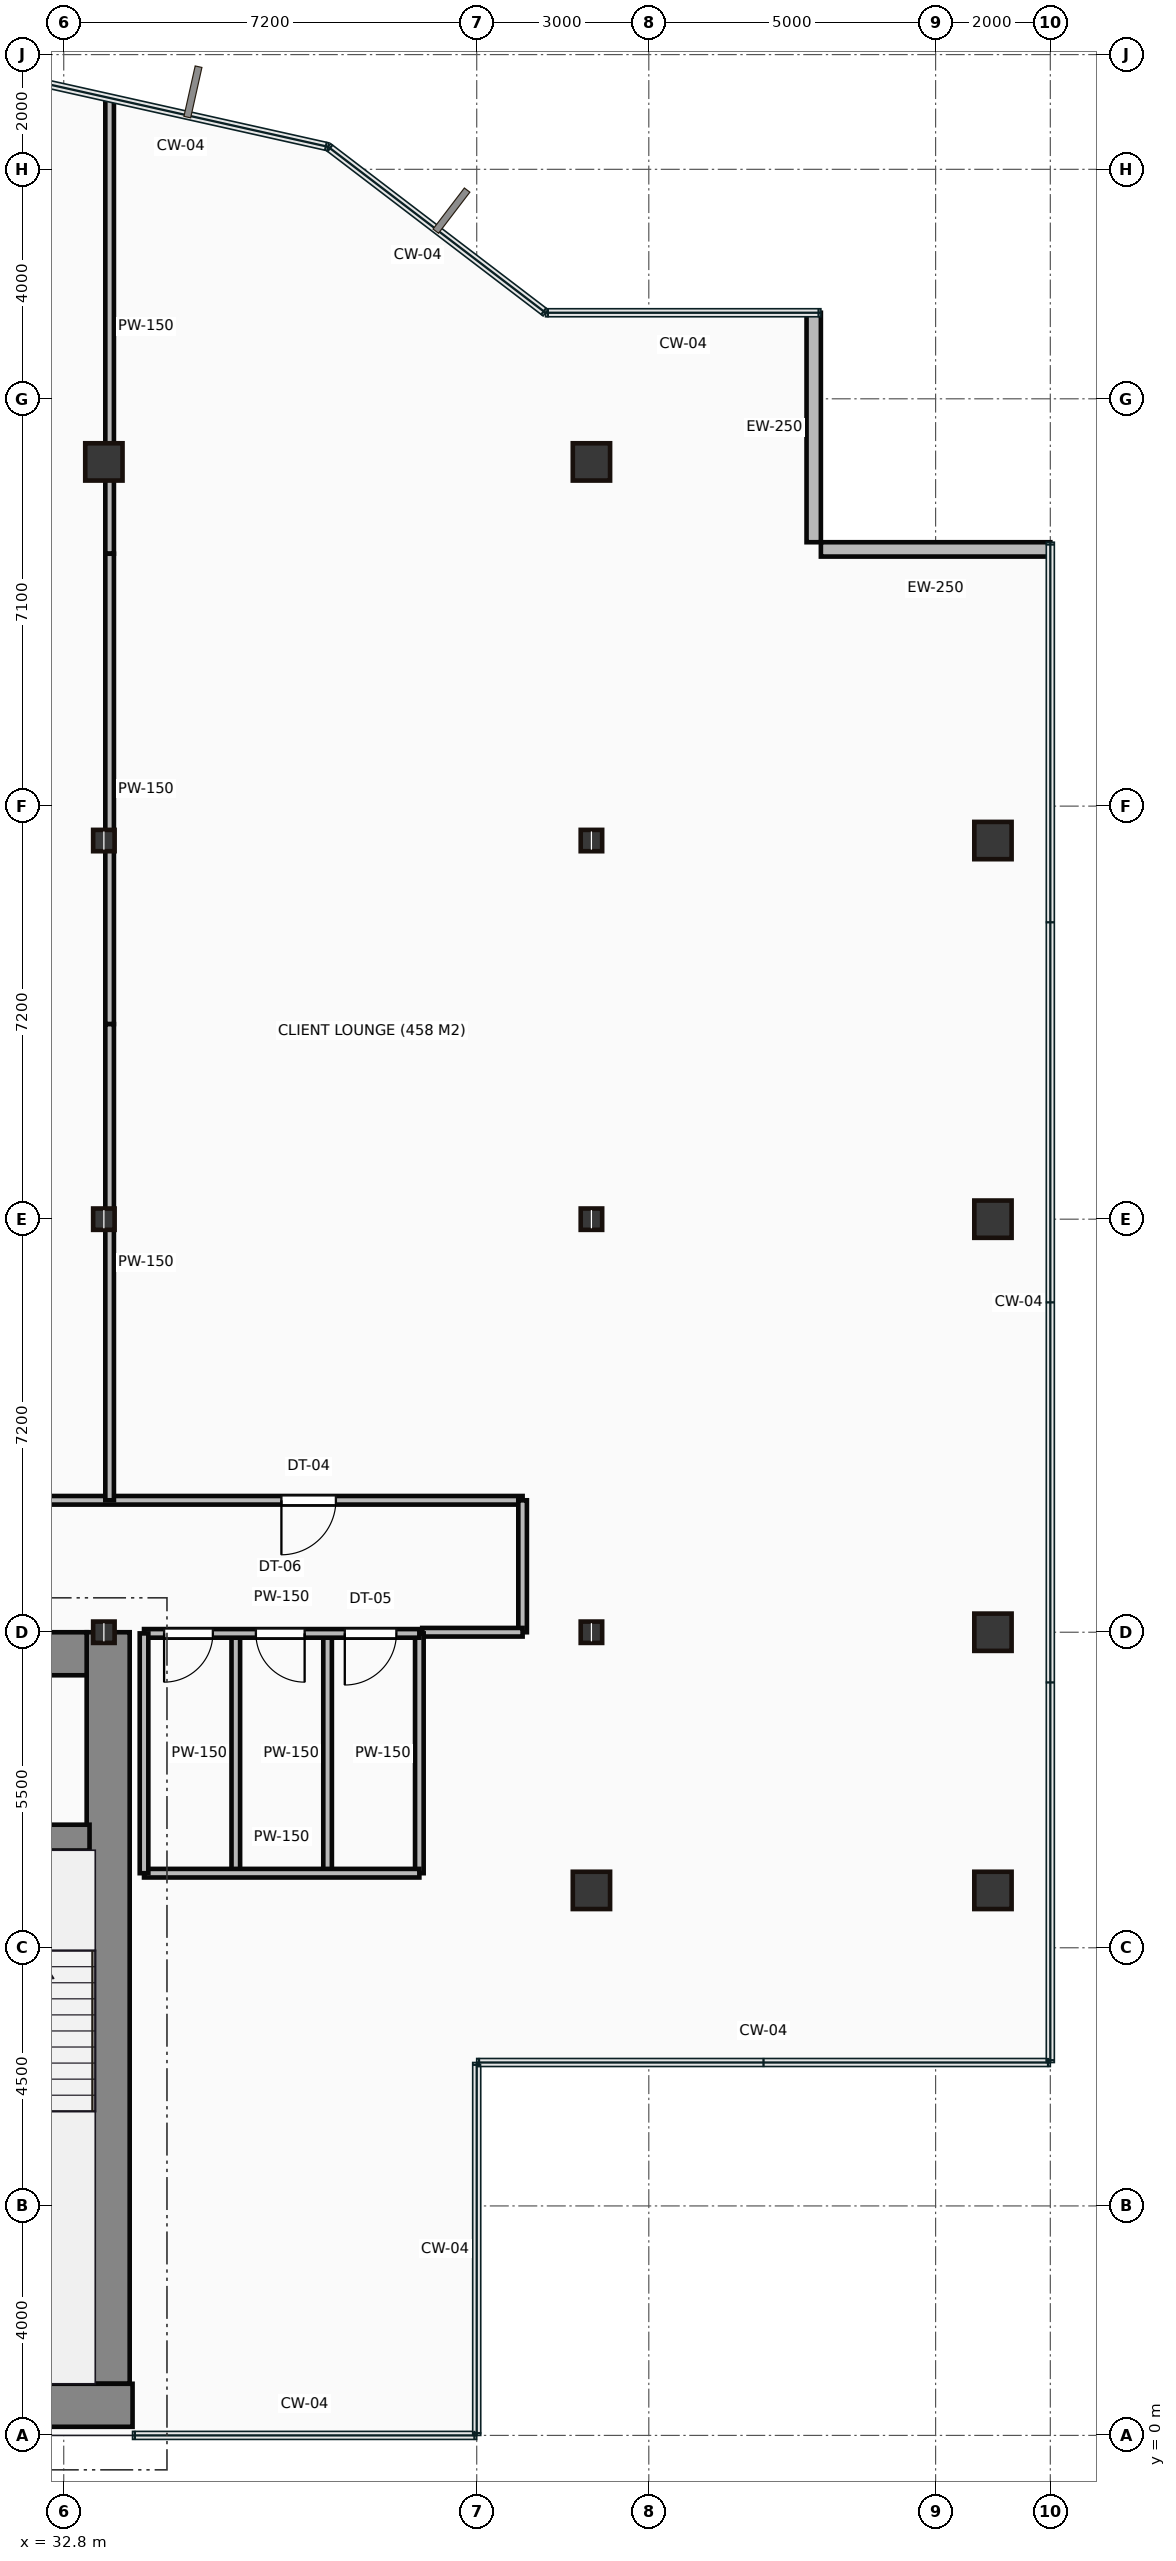
"""IFC4 building model, lengths in metres.
Left out: names, types, materials, properties, quantities, classifications, styles, units other than length and angle.
Written with IfcOpenShell. Run it as: python <this file> out.ifc"""

import sys

from ifc_helpers import new_model, si_unit, direction, frame, frame_2d, origin, origin_2d, place, context, subcontext, project, spatial, rectangle, hollow_rectangle, i_section, extrude, source, transform, mapped, element, fill, save


model = new_model("IFC4")
c1 = context("Model", 3, precision=1e-05, world=origin(), true_north=direction((0.0, 1.0)))
c2 = subcontext(c1, "Body", "Model", "MODEL_VIEW")
j1 = project(units=[si_unit("LENGTHUNIT", "METRE"), si_unit("PLANEANGLEUNIT", "RADIAN")], contexts=[c1])
p1 = place(None, origin())
s1 = spatial("IfcSite", under=j1, at=p1, CompositionType="ELEMENT")
p2 = place(p1, origin())
s2 = spatial("IfcBuilding", under=s1, at=p2, CompositionType="ELEMENT")
p3 = place(p2, frame((0.0, 0.0, 169.8)))
s3 = spatial("IfcBuildingStorey", under=s2, at=p3, CompositionType="ELEMENT", Elevation=169.8)
m1 = source(origin(), c2, "Body", "SweptSolid", [
    extrude(rectangle(XDim=29.5, YDim=0.75, at=frame_2d((14.75, 0.0))), origin(), (0.0, 0.0, 1.0), 3.65),
])
p4 = place(p3, frame((4.5, 0.525, 0.0), z_axis=(0.0, 0.0, 1.0), x_axis=(1.0, 0.0, 0.0)))
e1 = element("IfcWall", 1, at=p4, inside=s3, PredefinedType="SHEAR", context=c2, shape_type="MappedRepresentation", body=[
    mapped(m1, transform((0.0, 0.0, 0.0))),
])
m2 = source(origin(), c2, "Body", "SweptSolid", [
    extrude(rectangle(XDim=13.1, YDim=0.75, at=frame_2d((6.55, 0.0))), origin(), (0.0, 0.0, 1.0), 3.65),
])
p5 = place(p3, frame((33.575, 0.9, 0.0), z_axis=(0.0, 0.0, 1.0), x_axis=(0.0, 1.0, 0.0)))
e2 = element("IfcWall", 2, at=p5, inside=s3, PredefinedType="SHEAR", context=c2, shape_type="MappedRepresentation", body=[
    mapped(m2, transform((0.0, 0.0, 0.0))),
])
m3 = source(origin(), c2, "Body", "SweptSolid", [
    extrude(rectangle(XDim=12.6, YDim=0.75, at=frame_2d((6.3, 0.0))), origin(), (0.0, 0.0, 1.0), 3.65),
])
p6 = place(p3, frame((20.6, 13.625, 0.0), z_axis=(0.0, 0.0, 1.0), x_axis=(1.0, 0.0, 0.0)))
e3 = element("IfcWall", 3, at=p6, inside=s3, PredefinedType="SHEAR", context=c2, shape_type="MappedRepresentation", body=[
    mapped(m3, transform((0.0, 0.0, 0.0))),
])
p7 = place(p6, frame((9.25, 0.0, 0.0)))
e4 = element("IfcOpeningElement", 4, at=p7, cuts=e3, PredefinedType="OPENING", context=c2, shape_type="SweptSolid", body=[
    extrude(rectangle(XDim=1.1, YDim=2.15, at=frame_2d((0.55, 1.075))), frame((0.0, 0.385, 0.0), z_axis=(0.0, -1.0, 0.0), x_axis=(1.0, 0.0, 0.0)), (0.0, 0.0, 1.0), 0.77),
])
m4 = source(origin(), c2, "Body", "SweptSolid", [
    extrude(rectangle(XDim=3.39, YDim=0.45, at=frame_2d((1.695, 0.0))), origin(), (0.0, 0.0, 1.0), 3.65),
])
p8 = place(p3, frame((29.86, 10.42, 0.0), z_axis=(0.0, 0.0, 1.0), x_axis=(1.0, 0.0, 0.0)))
e5 = element("IfcWall", 5, at=p8, inside=s3, PredefinedType="SHEAR", context=c2, shape_type="MappedRepresentation", body=[
    mapped(m4, transform((0.0, 0.0, 0.0))),
])
p9 = place(p8, frame((1.1, 0.0, 0.0)))
e6 = element("IfcOpeningElement", 6, at=p9, cuts=e5, PredefinedType="OPENING", context=c2, shape_type="SweptSolid", body=[
    extrude(rectangle(XDim=1.1, YDim=2.15, at=frame_2d((0.55, 1.075))), frame((0.0, 0.235, 0.0), z_axis=(0.0, -1.0, 0.0), x_axis=(1.0, 0.0, 0.0)), (0.0, 0.0, 1.0), 0.47),
])
m5 = source(origin(), c2, "Body", "SweptSolid", [
    extrude(i_section(OverallWidth=0.374, OverallDepth=0.372, WebThickness=0.016, FlangeThickness=0.026, at=origin_2d()), origin(), (0.0, 0.0, 1.0), 3.65),
])
for number, where, z_axis, x_axis in (
    (7, (33.5, 14.0, 0.0), (0.0, 0.0, 1.0), (1.0, 0.0, 0.0)),
    (8, (33.5, 21.2, 0.0), (0.0, 0.0, 1.0), (1.0, 0.0, 0.0)),
    (9, (33.5, 27.8, 0.0), (0.0, 0.0, 1.0), (1.0, 0.0, 0.0)),
):
    element("IfcColumn", number, at=place(p3, frame(where, z_axis=z_axis, x_axis=x_axis)), inside=s3, PredefinedType="COLUMN", context=c2, shape_type="MappedRepresentation", body=[
        mapped(m5, transform((0.0, 0.0, 0.0))),
    ])
m6 = source(origin(), c2, "Body", "SweptSolid", [
    extrude(hollow_rectangle(XDim=0.65, YDim=0.65, WallThickness=0.032, at=origin_2d()), origin(), (0.0, 0.0, 1.0), 3.65),
])
for number, where, z_axis, x_axis in (
    (10, (33.5, 34.4, 0.0), (0.0, 0.0, 1.0), (1.0, 0.0, 0.0)),
    (11, (42.0, 9.5, 0.0), (0.0, 0.0, 1.0), (1.0, 0.0, 0.0)),
):
    element("IfcColumn", number, at=place(p3, frame(where, z_axis=z_axis, x_axis=x_axis)), inside=s3, PredefinedType="COLUMN", context=c2, shape_type="MappedRepresentation", body=[
        mapped(m6, transform((0.0, 0.0, 0.0))),
    ])
for number, where, z_axis, x_axis in (
    (12, (42.0, 14.0, 0.0), (0.0, 0.0, 1.0), (1.0, 0.0, 0.0)),
    (13, (42.0, 21.2, 0.0), (0.0, 0.0, 1.0), (1.0, 0.0, 0.0)),
    (14, (42.0, 27.8, 0.0), (0.0, 0.0, 1.0), (1.0, 0.0, 0.0)),
):
    element("IfcColumn", number, at=place(p3, frame(where, z_axis=z_axis, x_axis=x_axis)), inside=s3, PredefinedType="COLUMN", context=c2, shape_type="MappedRepresentation", body=[
        mapped(m5, transform((0.0, 0.0, 0.0))),
    ])
for number, where, z_axis, x_axis in (
    (15, (42.0, 34.4, 0.0), (0.0, 0.0, 1.0), (1.0, 0.0, 0.0)),
    (16, (49.0, 9.5, 0.0), (0.0, 0.0, 1.0), (1.0, 0.0, 0.0)),
    (17, (49.0, 14.0, 0.0), (0.0, 0.0, 1.0), (1.0, 0.0, 0.0)),
    (18, (49.0, 21.2, 0.0), (0.0, 0.0, 1.0), (1.0, 0.0, 0.0)),
    (19, (49.0, 27.8, 0.0), (0.0, 0.0, 1.0), (1.0, 0.0, 0.0)),
):
    element("IfcColumn", number, at=place(p3, frame(where, z_axis=z_axis, x_axis=x_axis)), inside=s3, PredefinedType="COLUMN", context=c2, shape_type="MappedRepresentation", body=[
        mapped(m6, transform((0.0, 0.0, 0.0))),
    ])
m7 = source(origin(), c2, "Body", "SweptSolid", [
    extrude(rectangle(XDim=4.0, YDim=0.25, at=frame_2d((2.0, 0.0))), origin(), (0.0, 0.0, 1.0), 3.4),
])
for number, where, z_axis, x_axis in (
    (20, (50.0, 32.875, 0.0), (0.0, 0.0, 1.0), (-1.0, 0.0, 0.0)),
    (21, (45.875, 33.0, 0.0), (0.0, 0.0, 1.0), (0.0, 1.0, 0.0)),
):
    element("IfcWall", number, at=place(p3, frame(where, z_axis=z_axis, x_axis=x_axis)), inside=s3, PredefinedType="STANDARD", context=c2, shape_type="MappedRepresentation", body=[
        mapped(m7, transform((0.0, 0.0, 0.0))),
    ])
m8 = source(origin(), c2, "Body", "SweptSolid", [
    extrude(rectangle(XDim=4.8, YDim=0.15, at=frame_2d((2.4, 0.0))), origin(), (0.0, 0.0, 1.0), 2.76),
])
p10 = place(p3, frame((34.2, 13.98, 0.0), z_axis=(0.0, 0.0, 1.0), x_axis=(1.0, 0.0, 0.0)))
e22 = element("IfcWall", 22, at=p10, inside=s3, PredefinedType="PARTITIONING", context=c2, shape_type="MappedRepresentation", body=[
    mapped(m8, transform((0.0, 0.0, 0.0))),
])
p11 = place(p10, frame((0.35, 0.0, 0.0)))
e23 = element("IfcOpeningElement", 23, at=p11, cuts=e22, PredefinedType="OPENING", context=c2, shape_type="SweptSolid", body=[
    extrude(rectangle(XDim=0.85, YDim=2.1, at=frame_2d((0.425, 1.05))), frame((0.0, 0.085, 0.0), z_axis=(0.0, -1.0, 0.0), x_axis=(1.0, 0.0, 0.0)), (0.0, 0.0, 1.0), 0.17),
])
p12 = place(p10, frame((1.95, 0.0, 0.0)))
e24 = element("IfcOpeningElement", 24, at=p12, cuts=e22, PredefinedType="OPENING", context=c2, shape_type="SweptSolid", body=[
    extrude(rectangle(XDim=0.85, YDim=2.1, at=frame_2d((0.425, 1.05))), frame((0.0, 0.085, 0.0), z_axis=(0.0, -1.0, 0.0), x_axis=(1.0, 0.0, 0.0)), (0.0, 0.0, 1.0), 0.17),
])
p13 = place(p10, frame((3.5, 0.0, 0.0)))
e25 = element("IfcOpeningElement", 25, at=p13, cuts=e22, PredefinedType="OPENING", context=c2, shape_type="SweptSolid", body=[
    extrude(rectangle(XDim=0.9, YDim=2.1, at=frame_2d((0.45, 1.05))), frame((0.0, 0.085, 0.0), z_axis=(0.0, -1.0, 0.0), x_axis=(1.0, 0.0, 0.0)), (0.0, 0.0, 1.0), 0.17),
])
m9 = source(origin(), c2, "Body", "SweptSolid", [
    extrude(rectangle(XDim=4.8, YDim=0.15, at=frame_2d((2.4, 0.0))), origin(), (0.0, 0.0, 1.0), 3.4),
])
p14 = place(p3, frame((34.2, 9.8, 0.0), z_axis=(0.0, 0.0, 1.0), x_axis=(1.0, 0.0, 0.0)))
e26 = element("IfcWall", 26, at=p14, inside=s3, PredefinedType="PARTITIONING", context=c2, shape_type="MappedRepresentation", body=[
    mapped(m9, transform((0.0, 0.0, 0.0))),
])
m10 = source(origin(), c2, "Body", "SweptSolid", [
    extrude(rectangle(XDim=4.18, YDim=0.15, at=frame_2d((2.09, 0.0))), origin(), (0.0, 0.0, 1.0), 3.4),
])
for number, where, z_axis, x_axis in (
    (27, (39.0, 9.8, 0.0), (0.0, 0.0, 1.0), (0.0, 1.0, 0.0)),
    (28, (34.2, 9.8, 0.0), (0.0, 0.0, 1.0), (0.0, 1.0, 0.0)),
    (29, (35.8, 9.8, 0.0), (0.0, 0.0, 1.0), (0.0, 1.0, 0.0)),
    (30, (37.4, 9.8, 0.0), (0.0, 0.0, 1.0), (0.0, 1.0, 0.0)),
):
    element("IfcWall", number, at=place(p3, frame(where, z_axis=z_axis, x_axis=x_axis)), inside=s3, PredefinedType="PARTITIONING", context=c2, shape_type="MappedRepresentation", body=[
        mapped(m10, transform((0.0, 0.0, 0.0))),
    ])
m11 = source(origin(), c2, "Body", "SweptSolid", [
    extrude(rectangle(XDim=28.75, YDim=0.15, at=frame_2d((14.375, 0.0))), origin(), (0.0, 0.0, 1.0), 3.4),
])
p15 = place(p3, frame((12.05, 16.3, 0.0), z_axis=(0.0, 0.0, 1.0), x_axis=(1.0, 0.0, 0.0)))
e31 = element("IfcWall", 31, at=p15, inside=s3, PredefinedType="PARTITIONING", context=c2, shape_type="MappedRepresentation", body=[
    mapped(m11, transform((0.0, 0.0, 0.0))),
])
p16 = place(p15, frame((4.83, 0.0, 0.0)))
e32 = element("IfcOpeningElement", 32, at=p16, cuts=e31, PredefinedType="OPENING", context=c2, shape_type="SweptSolid", body=[
    extrude(rectangle(XDim=0.95, YDim=2.15, at=frame_2d((0.475, 1.075))), frame((0.0, 0.085, 0.0), z_axis=(0.0, -1.0, 0.0), x_axis=(1.0, 0.0, 0.0)), (0.0, 0.0, 1.0), 0.17),
])
p17 = place(p15, frame((15.475, 0.0, 0.0)))
e33 = element("IfcOpeningElement", 33, at=p17, cuts=e31, PredefinedType="OPENING", context=c2, shape_type="SweptSolid", body=[
    extrude(rectangle(XDim=0.95, YDim=2.15, at=frame_2d((0.475, 1.075))), frame((0.0, 0.085, 0.0), z_axis=(0.0, -1.0, 0.0), x_axis=(1.0, 0.0, 0.0)), (0.0, 0.0, 1.0), 0.17),
])
p18 = place(p15, frame((24.545, 0.0, 0.0)))
e34 = element("IfcOpeningElement", 34, at=p18, cuts=e31, PredefinedType="OPENING", context=c2, shape_type="SweptSolid", body=[
    extrude(rectangle(XDim=0.95, YDim=2.15, at=frame_2d((0.475, 1.075))), frame((0.0, 0.085, 0.0), z_axis=(0.0, -1.0, 0.0), x_axis=(1.0, 0.0, 0.0)), (0.0, 0.0, 1.0), 0.17),
])
m12 = source(origin(), c2, "Body", "SweptSolid", [
    extrude(rectangle(XDim=2.3, YDim=0.15, at=frame_2d((1.15, 0.0))), origin(), (0.0, 0.0, 1.0), 3.4),
])
p19 = place(p3, frame((40.8, 16.3, 0.0), z_axis=(0.0, 0.0, 1.0), x_axis=(0.0, -1.0, 0.0)))
e35 = element("IfcWall", 35, at=p19, inside=s3, PredefinedType="PARTITIONING", context=c2, shape_type="MappedRepresentation", body=[
    mapped(m12, transform((0.0, 0.0, 0.0))),
])
m13 = source(origin(), c2, "Body", "SweptSolid", [
    extrude(rectangle(XDim=1.75, YDim=0.15, at=frame_2d((0.875, 0.0))), origin(), (0.0, 0.0, 1.0), 2.76),
])
p20 = place(p3, frame((40.8, 14.0, 0.0), z_axis=(0.0, 0.0, 1.0), x_axis=(-1.0, 0.0, 0.0)))
e36 = element("IfcWall", 36, at=p20, inside=s3, PredefinedType="PARTITIONING", context=c2, shape_type="MappedRepresentation", body=[
    mapped(m13, transform((0.0, 0.0, 0.0))),
])
m14 = source(origin(), c2, "Body", "SweptSolid", [
    extrude(rectangle(XDim=7.923, YDim=0.15, at=frame_2d((3.962, 0.0))), origin(), (0.0, 0.0, 1.0), 2.76),
])
p21 = place(p3, frame((33.6, 40.723, 0.0), z_axis=(0.0, 0.0, 1.0), x_axis=(0.0, -1.0, 0.0)))
e37 = element("IfcWall", 37, at=p21, inside=s3, PredefinedType="PARTITIONING", context=c2, shape_type="MappedRepresentation", body=[
    mapped(m14, transform((0.0, 0.0, 0.0))),
])
m15 = source(origin(), c2, "Body", "SweptSolid", [
    extrude(rectangle(XDim=8.2, YDim=0.15, at=frame_2d((4.1, 0.0))), origin(), (0.0, 0.0, 1.0), 2.76),
])
p22 = place(p3, frame((33.6, 32.8, 0.0), z_axis=(0.0, 0.0, 1.0), x_axis=(0.0, -1.0, 0.0)))
e38 = element("IfcWall", 38, at=p22, inside=s3, PredefinedType="PARTITIONING", context=c2, shape_type="MappedRepresentation", body=[
    mapped(m15, transform((0.0, 0.0, 0.0))),
])
m16 = source(origin(), c2, "Body", "SweptSolid", [
    extrude(rectangle(XDim=8.3, YDim=0.15, at=frame_2d((4.15, 0.0))), origin(), (0.0, 0.0, 1.0), 2.76),
])
p23 = place(p3, frame((33.6, 24.6, 0.0), z_axis=(0.0, 0.0, 1.0), x_axis=(0.0, -1.0, 0.0)))
e39 = element("IfcWall", 39, at=p23, inside=s3, PredefinedType="PARTITIONING", context=c2, shape_type="MappedRepresentation", body=[
    mapped(m16, transform((0.0, 0.0, 0.0))),
])
m17 = source(origin(), c2, "Body", "SweptSolid", [
    extrude(rectangle(XDim=0.85, YDim=2.1, at=frame_2d((0.425, 1.05))), frame((0.0, 0.025, 0.0), z_axis=(0.0, -1.0, 0.0), x_axis=(1.0, 0.0, 0.0)), (0.0, 0.0, 1.0), 0.05),
])
p24 = place(p11, frame((0.85, 0.0, 0.0), z_axis=(0.0, 0.0, 1.0), x_axis=(-1.0, 0.0, 0.0)))
e40 = element("IfcDoor", 40, at=p24, inside=s3, OperationType="SINGLE_SWING_LEFT", PredefinedType="DOOR", context=c2, shape_type="MappedRepresentation", body=[
    mapped(m17, transform((0.0, 0.0, 0.0))),
])
fill(e23, e40)
p25 = place(p12, frame((0.85, 0.0, 0.0), z_axis=(0.0, 0.0, 1.0), x_axis=(-1.0, 0.0, 0.0)))
e41 = element("IfcDoor", 41, at=p25, inside=s3, OperationType="SINGLE_SWING_RIGHT", PredefinedType="DOOR", context=c2, shape_type="MappedRepresentation", body=[
    mapped(m17, transform((0.0, 0.0, 0.0))),
])
fill(e24, e41)
m18 = source(origin(), c2, "Body", "SweptSolid", [
    extrude(rectangle(XDim=0.9, YDim=2.1, at=frame_2d((0.45, 1.05))), frame((0.0, 0.025, 0.0), z_axis=(0.0, -1.0, 0.0), x_axis=(1.0, 0.0, 0.0)), (0.0, 0.0, 1.0), 0.05),
])
p26 = place(p13, frame((0.9, 0.0, 0.0), z_axis=(0.0, 0.0, 1.0), x_axis=(-1.0, 0.0, 0.0)))
e42 = element("IfcDoor", 42, at=p26, inside=s3, OperationType="SINGLE_SWING_LEFT", PredefinedType="DOOR", context=c2, shape_type="MappedRepresentation", body=[
    mapped(m18, transform((0.0, 0.0, 0.0))),
])
fill(e25, e42)
m19 = source(origin(), c2, "Body", "SweptSolid", [
    extrude(rectangle(XDim=0.95, YDim=2.15, at=frame_2d((0.475, 1.075))), frame((0.0, 0.025, 0.0), z_axis=(0.0, -1.0, 0.0), x_axis=(1.0, 0.0, 0.0)), (0.0, 0.0, 1.0), 0.05),
])
p27 = place(p18, origin())
e43 = element("IfcDoor", 43, at=p27, inside=s3, OperationType="SINGLE_SWING_LEFT", PredefinedType="DOOR", context=c2, shape_type="MappedRepresentation", body=[
    mapped(m19, transform((0.0, 0.0, 0.0))),
])
fill(e34, e43)
save(model, sys.argv[1])
